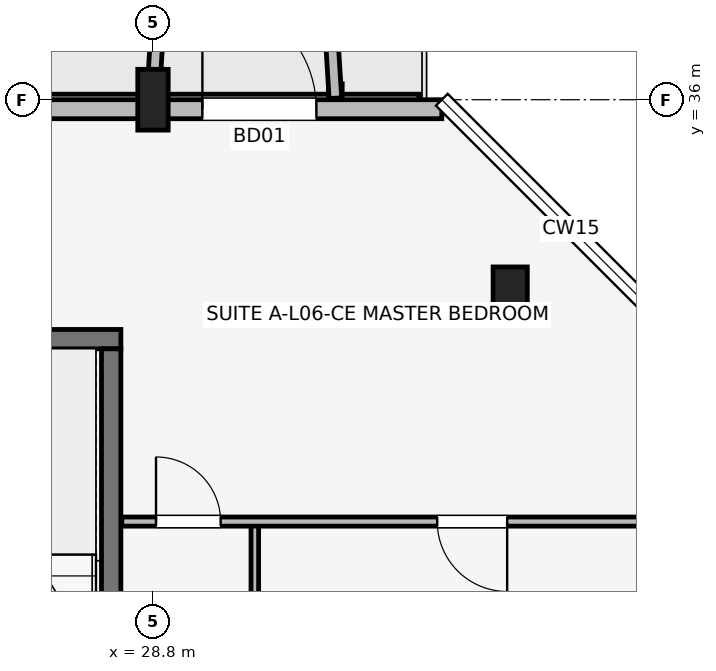
"""IFC4 building model, lengths in metres.
Left out: names, types, materials, properties, quantities, classifications, styles, units other than length and angle.
Written with IfcOpenShell. Run it as: python <this file> out.ifc"""

import sys

from ifc_helpers import new_model, si_unit, direction, frame, frame_2d, origin, origin_2d, place, context, subcontext, project, spatial, rectangle, extrude, element, fill, save


model = new_model("IFC4")
c1 = context("Model", 3, precision=1e-05, world=origin(), true_north=direction((0.0, 1.0)))
c2 = subcontext(c1, "Body", "Model", "MODEL_VIEW")
j1 = project(units=[si_unit("LENGTHUNIT", "METRE"), si_unit("PLANEANGLEUNIT", "RADIAN")], contexts=[c1])
p1 = place(None, origin())
s1 = spatial("IfcSite", under=j1, at=p1, CompositionType="ELEMENT")
p2 = place(p1, origin())
s2 = spatial("IfcBuilding", under=s1, at=p2, CompositionType="ELEMENT")
p3 = place(p2, frame((0.0, 0.0, 21.3)))
s3 = spatial("IfcBuildingStorey", under=s2, at=p3, CompositionType="ELEMENT", Elevation=21.3)
p4 = place(p3, frame((28.8, 36.0, 0.0), z_axis=(0.0, 0.0, 1.0), x_axis=(1.0, 0.0, 0.0)))
e1 = element("IfcColumn", 1, at=p4, inside=s3, PredefinedType="COLUMN", context=c2, shape_type="SweptSolid", body=[
    extrude(rectangle(XDim=0.4, YDim=0.8, at=origin_2d()), origin(), (0.0, 0.0, 1.0), 3.15),
])
p5 = place(p3, frame((33.5, 33.5, 0.0), z_axis=(0.0, 0.0, 1.0), x_axis=(1.0, 0.0, 0.0)))
e2 = element("IfcColumn", 2, at=p5, inside=s3, PredefinedType="COLUMN", context=c2, shape_type="SweptSolid", body=[
    extrude(rectangle(XDim=0.45, YDim=0.6, at=origin_2d()), origin(), (0.0, 0.0, 1.0), 3.15),
])
p6 = place(p3, frame((25.073, 32.85, 0.0), z_axis=(0.0, 0.0, 1.0), x_axis=(1.0, 0.0, 0.0)))
e3 = element("IfcWall", 3, at=p6, inside=s3, PredefinedType="SHEAR", context=c2, shape_type="SweptSolid", body=[
    extrude(rectangle(XDim=3.305, YDim=0.255, at=frame_2d((1.652, 0.0))), origin(), (0.0, 0.0, 1.0), 3.15),
])
p7 = place(p3, frame((28.25, 26.427, 0.0), z_axis=(0.0, 0.0, 1.0), x_axis=(0.0, 1.0, 0.0)))
e4 = element("IfcWall", 4, at=p7, inside=s3, PredefinedType="SHEAR", context=c2, shape_type="SweptSolid", body=[
    extrude(rectangle(XDim=6.295, YDim=0.255, at=frame_2d((3.147, 0.0))), origin(), (0.0, 0.0, 1.0), 3.15),
])
p8 = place(p3, frame((32.6, 35.875, 0.0), z_axis=(0.0, 0.0, 1.0), x_axis=(-1.0, 0.0, 0.0)))
e5 = element("IfcWall", 5, at=p8, inside=s3, PredefinedType="SOLIDWALL", context=c2, shape_type="SweptSolid", body=[
    extrude(rectangle(XDim=29.2, YDim=0.25, at=frame_2d((14.6, 0.0))), origin(), (0.0, 0.0, 1.0), 2.43),
])
p9 = place(p8, frame((27.55, 0.0, 0.0), z_axis=(0.0, 0.0, 1.0), x_axis=(-1.0, 0.0, 0.0)))
e6 = element("IfcOpeningElement", 6, at=p9, cuts=e5, PredefinedType="OPENING", context=c2, shape_type="SweptSolid", body=[
    extrude(rectangle(XDim=1.5, YDim=2.15, at=frame_2d((0.75, 1.075))), frame((0.0, 0.135, 0.0), z_axis=(0.0, -1.0, 0.0), x_axis=(1.0, 0.0, 0.0)), (0.0, 0.0, 1.0), 0.27),
])
p10 = place(p8, frame((3.15, 0.0, 0.0), z_axis=(0.0, 0.0, 1.0), x_axis=(-1.0, 0.0, 0.0)))
e7 = element("IfcOpeningElement", 7, at=p10, cuts=e5, PredefinedType="OPENING", context=c2, shape_type="SweptSolid", body=[
    extrude(rectangle(XDim=1.5, YDim=2.15, at=frame_2d((0.75, 1.075))), frame((0.0, 0.135, 0.0), z_axis=(0.0, -1.0, 0.0), x_axis=(1.0, 0.0, 0.0)), (0.0, 0.0, 1.0), 0.27),
])
p11 = place(p8, frame((14.225, 0.0, 0.5)))
e8 = element("IfcOpeningElement", 8, at=p11, cuts=e5, PredefinedType="OPENING", context=c2, shape_type="SweptSolid", body=[
    extrude(rectangle(XDim=0.75, YDim=1.75, at=frame_2d((0.375, 0.875))), frame((0.0, 0.135, 0.0), z_axis=(0.0, -1.0, 0.0), x_axis=(1.0, 0.0, 0.0)), (0.0, 0.0, 1.0), 0.27),
])
p12 = place(p8, frame((8.82, 0.0, 0.7)))
e9 = element("IfcOpeningElement", 9, at=p12, cuts=e5, PredefinedType="OPENING", context=c2, shape_type="SweptSolid", body=[
    extrude(rectangle(XDim=1.72, YDim=1.6, at=frame_2d((0.86, 0.8))), frame((0.0, 0.135, 0.0), z_axis=(0.0, -1.0, 0.0), x_axis=(1.0, 0.0, 0.0)), (0.0, 0.0, 1.0), 0.27),
])
p13 = place(p8, frame((18.59, 0.0, 0.7)))
e10 = element("IfcOpeningElement", 10, at=p13, cuts=e5, PredefinedType="OPENING", context=c2, shape_type="SweptSolid", body=[
    extrude(rectangle(XDim=1.86, YDim=1.6, at=frame_2d((0.93, 0.8))), frame((0.0, 0.135, 0.0), z_axis=(0.0, -1.0, 0.0), x_axis=(1.0, 0.0, 0.0)), (0.0, 0.0, 1.0), 0.27),
])
for number, where, z_axis, x_axis in (
    (11, (28.8, 36.02, 0.0), (0.0, 0.0, 1.0), (0.061, 0.998, 0.0)),
    (12, (31.2, 36.02, 0.0), (0.0, 0.0, 1.0), (-0.061, 0.998, 0.0)),
):
    element("IfcWall", number, at=place(p3, frame(where, z_axis=z_axis, x_axis=x_axis)), inside=s3, PredefinedType="ELEMENTEDWALL", context=c2, shape_type="SweptSolid", body=[
        extrude(rectangle(XDim=1.964, YDim=0.165, at=frame_2d((0.982, 0.0))), origin(), (0.0, 0.0, 1.0), 2.95),
    ])
p14 = place(p3, frame((30.14, 26.1, 0.0), z_axis=(0.0, 0.0, 1.0), x_axis=(0.0, 1.0, 0.0)))
e13 = element("IfcWall", 13, at=p14, inside=s3, PredefinedType="PARTITIONING", context=c2, shape_type="SweptSolid", body=[
    extrude(rectangle(XDim=4.35, YDim=0.1, at=frame_2d((2.175, 0.0))), origin(), (0.0, 0.0, 1.0), 2.38),
])
p15 = place(p3, frame((28.39, 30.45, 0.0), z_axis=(0.0, 0.0, 1.0), x_axis=(1.0, 0.0, 0.0)))
e14 = element("IfcWall", 14, at=p15, inside=s3, PredefinedType="PARTITIONING", context=c2, shape_type="SweptSolid", body=[
    extrude(rectangle(XDim=7.47, YDim=0.12, at=frame_2d((3.735, 0.0))), origin(), (0.0, 0.0, 1.0), 2.38),
])
p16 = place(p15, frame((0.45, 0.0, 0.0)))
e15 = element("IfcOpeningElement", 15, at=p16, cuts=e14, PredefinedType="OPENING", context=c2, shape_type="SweptSolid", body=[
    extrude(rectangle(XDim=0.85, YDim=2.08, at=frame_2d((0.425, 1.04))), frame((0.0, 0.07, 0.0), z_axis=(0.0, -1.0, 0.0), x_axis=(1.0, 0.0, 0.0)), (0.0, 0.0, 1.0), 0.14),
])
p17 = place(p15, frame((5.07, 0.0, 0.0), z_axis=(0.0, 0.0, 1.0), x_axis=(-1.0, 0.0, 0.0)))
e16 = element("IfcOpeningElement", 16, at=p17, cuts=e14, PredefinedType="OPENING", context=c2, shape_type="SweptSolid", body=[
    extrude(rectangle(XDim=0.92, YDim=2.08, at=frame_2d((0.46, 1.04))), frame((0.0, 0.07, 0.0), z_axis=(0.0, -1.0, 0.0), x_axis=(1.0, 0.0, 0.0)), (0.0, 0.0, 1.0), 0.14),
])
p18 = place(p10, origin())
e17 = element("IfcDoor", 17, at=p18, inside=s3, OperationType="SINGLE_SWING_RIGHT", PredefinedType="DOOR", context=c2, shape_type="SweptSolid", body=[
    extrude(rectangle(XDim=1.5, YDim=2.15, at=frame_2d((0.75, 1.075))), frame((0.0, 0.025, 0.0), z_axis=(0.0, -1.0, 0.0), x_axis=(1.0, 0.0, 0.0)), (0.0, 0.0, 1.0), 0.05),
])
fill(e7, e17)
p19 = place(p16, origin())
e18 = element("IfcDoor", 18, at=p19, inside=s3, OperationType="SINGLE_SWING_LEFT", PredefinedType="DOOR", context=c2, shape_type="SweptSolid", body=[
    extrude(rectangle(XDim=0.85, YDim=2.08, at=frame_2d((0.425, 1.04))), frame((0.0, 0.025, 0.0), z_axis=(0.0, -1.0, 0.0), x_axis=(1.0, 0.0, 0.0)), (0.0, 0.0, 1.0), 0.05),
])
fill(e15, e18)
p20 = place(p17, origin())
e19 = element("IfcDoor", 19, at=p20, inside=s3, OperationType="SINGLE_SWING_RIGHT", PredefinedType="DOOR", context=c2, shape_type="SweptSolid", body=[
    extrude(rectangle(XDim=0.92, YDim=2.08, at=frame_2d((0.46, 1.04))), frame((0.0, 0.025, 0.0), z_axis=(0.0, -1.0, 0.0), x_axis=(1.0, 0.0, 0.0)), (0.0, 0.0, 1.0), 0.05),
])
fill(e16, e19)
save(model, sys.argv[1])
